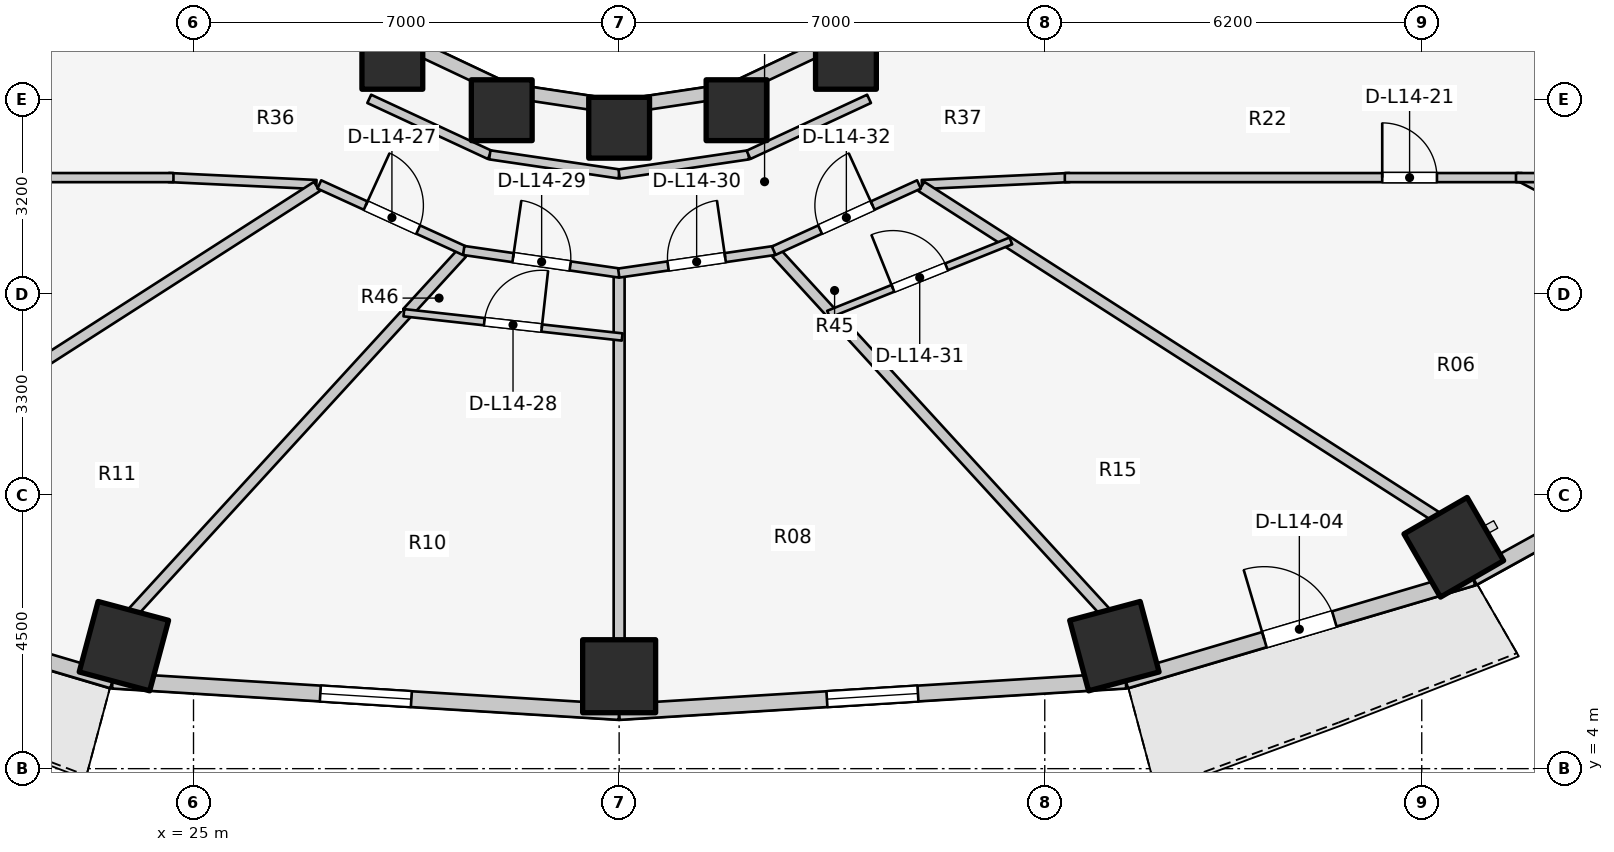
"""IFC4 building model, lengths in metres.
Left out: names, types, materials, properties, quantities, classifications, styles, units other than length and angle.
Written with IfcOpenShell. Run it as: python <this file> out.ifc"""

import sys

from ifc_helpers import new_model, si_unit, direction, frame, frame_2d, origin, origin_2d, place, context, subcontext, project, spatial, rectangle, extrude, element, fill, save


model = new_model("IFC4")
c1 = context("Model", 3, precision=1e-05, world=origin(), true_north=direction((0.0, 1.0)))
c2 = subcontext(c1, "Body", "Model", "MODEL_VIEW")
j1 = project(units=[si_unit("LENGTHUNIT", "METRE"), si_unit("PLANEANGLEUNIT", "RADIAN")], contexts=[c1])
p1 = place(None, origin())
s1 = spatial("IfcSite", under=j1, at=p1, CompositionType="ELEMENT")
p2 = place(p1, origin())
s2 = spatial("IfcBuilding", under=s1, at=p2, CompositionType="ELEMENT")
p3 = place(p2, frame((0.0, 0.0, 49.3)))
s3 = spatial("IfcBuildingStorey", under=s2, at=p3, CompositionType="ELEMENT", Elevation=49.3)
for number, where, z_axis, x_axis in (
    (1, (28.27, 15.673, 0.0), (0.0, 0.0, 1.0), (1.0, 0.0, 0.0)),
    (2, (30.069, 14.828, 0.0), (0.0, 0.0, 1.0), (1.0, 0.0, 0.0)),
):
    element("IfcColumn", number, at=place(p3, frame(where, z_axis=z_axis, x_axis=x_axis)), inside=s3, PredefinedType="COLUMN", context=c2, shape_type="SweptSolid", body=[
        extrude(rectangle(XDim=1.0, YDim=1.0, at=origin_2d()), origin(), (0.0, 0.0, 1.0), 3.1),
    ])
p4 = place(p3, frame((23.855, 6.014, 0.0), z_axis=(0.0, 0.0, 1.0), x_axis=(-0.258819045103, -0.965925826289, 0.0)))
e3 = element("IfcColumn", 3, at=p4, inside=s3, PredefinedType="COLUMN", context=c2, shape_type="SweptSolid", body=[
    extrude(rectangle(XDim=1.2, YDim=1.2, at=origin_2d()), origin(), (0.0, 0.0, 1.0), 3.1),
])
p5 = place(p3, frame((32.0, 14.54, 0.0), z_axis=(0.0, 0.0, 1.0), x_axis=(1.0, 0.0, 0.0)))
e4 = element("IfcColumn", 4, at=p5, inside=s3, PredefinedType="COLUMN", context=c2, shape_type="SweptSolid", body=[
    extrude(rectangle(XDim=1.0, YDim=1.0, at=origin_2d()), origin(), (0.0, 0.0, 1.0), 3.1),
])
p6 = place(p3, frame((32.0, 5.52, 0.0), z_axis=(0.0, 0.0, 1.0), x_axis=(0.0, -1.0, 0.0)))
e5 = element("IfcColumn", 5, at=p6, inside=s3, PredefinedType="COLUMN", context=c2, shape_type="SweptSolid", body=[
    extrude(rectangle(XDim=1.2, YDim=1.2, at=origin_2d()), origin(), (0.0, 0.0, 1.0), 3.1),
])
p7 = place(p3, frame((33.931, 14.828, 0.0), z_axis=(0.0, 0.0, 1.0), x_axis=(1.0, 0.0, 0.0)))
e6 = element("IfcColumn", 6, at=p7, inside=s3, PredefinedType="COLUMN", context=c2, shape_type="SweptSolid", body=[
    extrude(rectangle(XDim=1.0, YDim=1.0, at=origin_2d()), origin(), (0.0, 0.0, 1.0), 3.1),
])
p8 = place(p3, frame((40.145, 6.014, 0.0), z_axis=(0.0, 0.0, 1.0), x_axis=(0.258819045103, -0.965925826289, 0.0)))
e7 = element("IfcColumn", 7, at=p8, inside=s3, PredefinedType="COLUMN", context=c2, shape_type="SweptSolid", body=[
    extrude(rectangle(XDim=1.2, YDim=1.2, at=origin_2d()), origin(), (0.0, 0.0, 1.0), 3.1),
])
p9 = place(p3, frame((35.73, 15.673, 0.0), z_axis=(0.0, 0.0, 1.0), x_axis=(1.0, 0.0, 0.0)))
e8 = element("IfcColumn", 8, at=p9, inside=s3, PredefinedType="COLUMN", context=c2, shape_type="SweptSolid", body=[
    extrude(rectangle(XDim=1.0, YDim=1.0, at=origin_2d()), origin(), (0.0, 0.0, 1.0), 3.1),
])
p10 = place(p3, frame((45.727, 7.641, 0.0), z_axis=(0.0, 0.0, 1.0), x_axis=(0.5, -0.866025403784, 0.0)))
e9 = element("IfcColumn", 9, at=p10, inside=s3, PredefinedType="COLUMN", context=c2, shape_type="SweptSolid", body=[
    extrude(rectangle(XDim=1.2, YDim=1.2, at=origin_2d()), origin(), (0.0, 0.0, 1.0), 3.1),
])
p11 = place(p3, frame((28.44, 15.968, 0.0), z_axis=(0.0, 0.0, 1.0), x_axis=(0.904179699603, -0.427152280606, 0.0)))
e10 = element("IfcWall", 10, at=p11, inside=s3, PredefinedType="STANDARD", context=c2, shape_type="SweptSolid", body=[
    extrude(rectangle(XDim=1.899, YDim=0.23, at=frame_2d((0.95, 0.0))), origin(), (0.0, 0.0, 1.0), 2.16),
])
for number, where, z_axis, x_axis in (
    (11, (30.157, 15.157, 0.0), (0.0, 0.0, 1.0), (0.989, -0.149, 0.0)),
    (12, (32.0, 14.88, 0.0), (0.0, 0.0, 1.0), (0.989, 0.149, 0.0)),
):
    element("IfcWall", number, at=place(p3, frame(where, z_axis=z_axis, x_axis=x_axis)), inside=s3, PredefinedType="STANDARD", context=c2, shape_type="SweptSolid", body=[
        extrude(rectangle(XDim=1.864, YDim=0.23, at=frame_2d((0.932, 0.0))), origin(), (0.0, 0.0, 1.0), 2.16),
    ])
p12 = place(p3, frame((33.843, 15.157, 0.0), z_axis=(0.0, 0.0, 1.0), x_axis=(0.904179699603, 0.427152280606, 0.0)))
e13 = element("IfcWall", 13, at=p12, inside=s3, PredefinedType="STANDARD", context=c2, shape_type="SweptSolid", body=[
    extrude(rectangle(XDim=1.899, YDim=0.23, at=frame_2d((0.95, 0.0))), origin(), (0.0, 0.0, 1.0), 2.16),
])
p13 = place(p3, frame((17.958, 7.138, 0.0), z_axis=(0.0, 0.0, 1.0), x_axis=(0.958843593522, -0.283934786811, 0.0)))
e14 = element("IfcWall", 14, at=p13, inside=s3, PredefinedType="STANDARD", context=c2, shape_type="SweptSolid", body=[
    extrude(rectangle(XDim=5.955, YDim=0.26, at=frame_2d((2.978, 0.0))), origin(), (0.0, 0.0, 1.0), 2.88),
])
p14 = place(p13, frame((2.378, 0.0, 0.0)))
e15 = element("IfcOpeningElement", 15, at=p14, cuts=e14, PredefinedType="OPENING", context=c2, shape_type="SweptSolid", body=[
    extrude(rectangle(XDim=1.2, YDim=2.2, at=frame_2d((0.6, 1.1))), frame((0.0, 0.14, 0.0), z_axis=(0.0, -1.0, 0.0), x_axis=(1.0, 0.0, 0.0)), (0.0, 0.0, 1.0), 0.28),
])
p15 = place(p3, frame((23.668, 5.447, 0.0), z_axis=(0.0, 0.0, 1.0), x_axis=(0.998090514779, -0.061768311519, 0.0)))
e16 = element("IfcWall", 16, at=p15, inside=s3, PredefinedType="STANDARD", context=c2, shape_type="SweptSolid", body=[
    extrude(rectangle(XDim=8.348, YDim=0.26, at=frame_2d((4.174, 0.0))), origin(), (0.0, 0.0, 1.0), 2.85),
])
p16 = place(p15, frame((3.424, 0.0, 0.75)))
e17 = element("IfcOpeningElement", 17, at=p16, cuts=e16, PredefinedType="OPENING", context=c2, shape_type="SweptSolid", body=[
    extrude(rectangle(XDim=1.5, YDim=1.6, at=frame_2d((0.75, 0.8))), frame((0.0, 0.14, 0.0), z_axis=(0.0, -1.0, 0.0), x_axis=(1.0, 0.0, 0.0)), (0.0, 0.0, 1.0), 0.28),
])
p17 = place(p3, frame((32.0, 4.931, 0.0), z_axis=(0.0, 0.0, 1.0), x_axis=(0.998090514779, 0.061768311519, 0.0)))
e18 = element("IfcWall", 18, at=p17, inside=s3, PredefinedType="STANDARD", context=c2, shape_type="SweptSolid", body=[
    extrude(rectangle(XDim=8.348, YDim=0.26, at=frame_2d((4.174, 0.0))), origin(), (0.0, 0.0, 1.0), 2.85),
])
p18 = place(p17, frame((3.424, 0.0, 0.75)))
e19 = element("IfcOpeningElement", 19, at=p18, cuts=e18, PredefinedType="OPENING", context=c2, shape_type="SweptSolid", body=[
    extrude(rectangle(XDim=1.5, YDim=1.6, at=frame_2d((0.75, 0.8))), frame((0.0, 0.14, 0.0), z_axis=(0.0, -1.0, 0.0), x_axis=(1.0, 0.0, 0.0)), (0.0, 0.0, 1.0), 0.28),
])
p19 = place(p3, frame((40.332, 5.447, 0.0), z_axis=(0.0, 0.0, 1.0), x_axis=(0.958843593522, 0.283934786811, 0.0)))
e20 = element("IfcWall", 20, at=p19, inside=s3, PredefinedType="STANDARD", context=c2, shape_type="SweptSolid", body=[
    extrude(rectangle(XDim=5.955, YDim=0.26, at=frame_2d((2.978, 0.0))), origin(), (0.0, 0.0, 1.0), 2.88),
])
p20 = place(p19, frame((2.378, 0.0, 0.0)))
e21 = element("IfcOpeningElement", 21, at=p20, cuts=e20, PredefinedType="OPENING", context=c2, shape_type="SweptSolid", body=[
    extrude(rectangle(XDim=1.2, YDim=2.2, at=frame_2d((0.6, 1.1))), frame((0.0, 0.14, 0.0), z_axis=(0.0, -1.0, 0.0), x_axis=(1.0, 0.0, 0.0)), (0.0, 0.0, 1.0), 0.28),
])
p21 = place(p3, frame((46.042, 7.138, 0.0), z_axis=(0.0, 0.0, 1.0), x_axis=(0.875137303239, 0.483874674352, 0.0)))
e22 = element("IfcWall", 22, at=p21, inside=s3, PredefinedType="STANDARD", context=c2, shape_type="SweptSolid", body=[
    extrude(rectangle(XDim=4.985, YDim=0.26, at=frame_2d((2.493, 0.0))), origin(), (0.0, 0.0, 1.0), 2.85),
])
p22 = place(p3, frame((27.89, 15.015, 0.0), z_axis=(0.0, 0.0, 1.0), x_axis=(0.906943449489, -0.421252393975, 0.0)))
e23 = element("IfcWall", 23, at=p22, inside=s3, PredefinedType="PARTITIONING", context=c2, shape_type="SweptSolid", body=[
    extrude(rectangle(XDim=2.186, YDim=0.15, at=frame_2d((1.093, 0.0))), origin(), (0.0, 0.0, 1.0), 2.237),
])
for number, where, z_axis, x_axis in (
    (24, (29.873, 14.094, 0.0), (0.0, 0.0, 1.0), (0.989, -0.146, 0.0)),
    (25, (32.0, 13.78, 0.0), (0.0, 0.0, 1.0), (0.989, 0.146, 0.0)),
):
    element("IfcWall", number, at=place(p3, frame(where, z_axis=z_axis, x_axis=x_axis)), inside=s3, PredefinedType="PARTITIONING", context=c2, shape_type="SweptSolid", body=[
        extrude(rectangle(XDim=2.151, YDim=0.15, at=frame_2d((1.075, 0.0))), origin(), (0.0, 0.0, 1.0), 2.237),
    ])
p23 = place(p3, frame((34.127, 14.094, 0.0), z_axis=(0.0, 0.0, 1.0), x_axis=(0.906943449489, 0.421252393975, 0.0)))
e26 = element("IfcWall", 26, at=p23, inside=s3, PredefinedType="PARTITIONING", context=c2, shape_type="SweptSolid", body=[
    extrude(rectangle(XDim=2.186, YDim=0.15, at=frame_2d((1.093, 0.0))), origin(), (0.0, 0.0, 1.0), 2.237),
])
p24 = place(p3, frame((27.02, 13.606, 0.0), z_axis=(0.0, 0.0, 1.0), x_axis=(-0.998877427952, 0.047369651964, 0.0)))
e27 = element("IfcWall", 27, at=p24, inside=s3, PredefinedType="PARTITIONING", context=c2, shape_type="SweptSolid", body=[
    extrude(rectangle(XDim=2.433, YDim=0.15, at=frame_2d((1.216, 0.0))), origin(), (0.0, 0.0, 1.0), 2.237),
])
p25 = place(p3, frame((17.15, 13.72, 0.0), z_axis=(0.0, 0.0, 1.0), x_axis=(1.0, 0.0, 0.0)))
e28 = element("IfcWall", 28, at=p25, inside=s3, PredefinedType="PARTITIONING", context=c2, shape_type="SweptSolid", body=[
    extrude(rectangle(XDim=7.52, YDim=0.15, at=frame_2d((3.76, 0.0))), origin(), (0.0, 0.0, 1.0), 2.237),
])
p26 = place(p25, frame((1.3, 0.0, 0.0)))
e29 = element("IfcOpeningElement", 29, at=p26, cuts=e28, PredefinedType="OPENING", context=c2, shape_type="SweptSolid", body=[
    extrude(rectangle(XDim=0.9, YDim=2.1, at=frame_2d((0.45, 1.05))), frame((0.0, 0.085, 0.0), z_axis=(0.0, -1.0, 0.0), x_axis=(1.0, 0.0, 0.0)), (0.0, 0.0, 1.0), 0.17),
])
p27 = place(p3, frame((46.756, 13.743, 0.0), z_axis=(0.0, 0.0, 1.0), x_axis=(0.885586030676, -0.464475383924, 0.0)))
e30 = element("IfcWall", 30, at=p27, inside=s3, PredefinedType="MOVABLE", context=c2, shape_type="SweptSolid", body=[
    extrude(rectangle(XDim=2.376, YDim=0.12, at=frame_2d((1.188, 0.0))), origin(), (0.0, 0.0, 1.0), 2.855),
])
p28 = place(p3, frame((36.98, 13.606, 0.0), z_axis=(0.0, 0.0, 1.0), x_axis=(0.998877427952, 0.047369651964, 0.0)))
e31 = element("IfcWall", 31, at=p28, inside=s3, PredefinedType="PARTITIONING", context=c2, shape_type="SweptSolid", body=[
    extrude(rectangle(XDim=2.433, YDim=0.15, at=frame_2d((1.216, 0.0))), origin(), (0.0, 0.0, 1.0), 2.237),
])
p29 = place(p3, frame((39.33, 13.72, 0.0), z_axis=(0.0, 0.0, 1.0), x_axis=(1.0, 0.0, 0.0)))
e32 = element("IfcWall", 32, at=p29, inside=s3, PredefinedType="PARTITIONING", context=c2, shape_type="SweptSolid", body=[
    extrude(rectangle(XDim=7.52, YDim=0.15, at=frame_2d((3.76, 0.0))), origin(), (0.0, 0.0, 1.0), 2.237),
])
p30 = place(p29, frame((5.22, 0.0, 0.0)))
e33 = element("IfcOpeningElement", 33, at=p30, cuts=e32, PredefinedType="OPENING", context=c2, shape_type="SweptSolid", body=[
    extrude(rectangle(XDim=0.9, YDim=2.1, at=frame_2d((0.45, 1.05))), frame((0.0, 0.085, 0.0), z_axis=(0.0, -1.0, 0.0), x_axis=(1.0, 0.0, 0.0)), (0.0, 0.0, 1.0), 0.17),
])
p31 = place(p3, frame((46.75, 13.72, 0.0), z_axis=(0.0, 0.0, 1.0), x_axis=(1.0, 0.0, 0.0)))
e34 = element("IfcWall", 34, at=p31, inside=s3, PredefinedType="PARTITIONING", context=c2, shape_type="SweptSolid", body=[
    extrude(rectangle(XDim=5.05, YDim=0.15, at=frame_2d((2.525, 0.0))), origin(), (0.0, 0.0, 1.0), 2.069),
])
p32 = place(p3, frame((27.029, 13.574, 0.0), z_axis=(0.0, 0.0, 1.0), x_axis=(-0.841689919529, -0.5399611832, 0.0)))
e35 = element("IfcWall", 35, at=p32, inside=s3, PredefinedType="PARTITIONING", context=c2, shape_type="SweptSolid", body=[
    extrude(rectangle(XDim=10.058, YDim=0.18, at=frame_2d((5.029, 0.0))), origin(), (0.0, 0.0, 1.0), 2.237),
])
p33 = place(p3, frame((29.414, 12.479, 0.0), z_axis=(0.0, 0.0, 1.0), x_axis=(-0.675465011224, -0.737392038615, 0.0)))
e36 = element("IfcWall", 36, at=p33, inside=s3, PredefinedType="PARTITIONING", context=c2, shape_type="SweptSolid", body=[
    extrude(rectangle(XDim=8.007, YDim=0.18, at=frame_2d((4.003, 0.0))), origin(), (0.0, 0.0, 1.0), 2.237),
])
p34 = place(p3, frame((32.0, 12.095, 0.0), z_axis=(0.0, 0.0, 1.0), x_axis=(0.0, -1.0, 0.0)))
e37 = element("IfcWall", 37, at=p34, inside=s3, PredefinedType="PARTITIONING", context=c2, shape_type="SweptSolid", body=[
    extrude(rectangle(XDim=5.995, YDim=0.18, at=frame_2d((2.998, 0.0))), origin(), (0.0, 0.0, 1.0), 2.237),
])
p35 = place(p3, frame((34.586, 12.479, 0.0), z_axis=(0.0, 0.0, 1.0), x_axis=(0.675465011224, -0.737392038615, 0.0)))
e38 = element("IfcWall", 38, at=p35, inside=s3, PredefinedType="PARTITIONING", context=c2, shape_type="SweptSolid", body=[
    extrude(rectangle(XDim=8.007, YDim=0.18, at=frame_2d((4.003, 0.0))), origin(), (0.0, 0.0, 1.0), 2.237),
])
p36 = place(p3, frame((36.971, 13.574, 0.0), z_axis=(0.0, 0.0, 1.0), x_axis=(0.841689919529, -0.5399611832, 0.0)))
e39 = element("IfcWall", 39, at=p36, inside=s3, PredefinedType="PARTITIONING", context=c2, shape_type="SweptSolid", body=[
    extrude(rectangle(XDim=10.058, YDim=0.18, at=frame_2d((5.029, 0.0))), origin(), (0.0, 0.0, 1.0), 2.237),
])
p37 = place(p3, frame((27.069, 13.607, 0.0), z_axis=(0.0, 0.0, 1.0), x_axis=(0.909747571199, -0.415161843982, 0.0)))
e40 = element("IfcWall", 40, at=p37, inside=s3, PredefinedType="PARTITIONING", context=c2, shape_type="SweptSolid", body=[
    extrude(rectangle(XDim=2.625, YDim=0.15, at=frame_2d((1.312, 0.0))), origin(), (0.0, 0.0, 1.0), 2.237),
])
p38 = place(p37, frame((0.838, 0.0, 0.0)))
e41 = element("IfcOpeningElement", 41, at=p38, cuts=e40, PredefinedType="OPENING", context=c2, shape_type="SweptSolid", body=[
    extrude(rectangle(XDim=0.95, YDim=2.1, at=frame_2d((0.475, 1.05))), frame((0.0, 0.085, 0.0), z_axis=(0.0, -1.0, 0.0), x_axis=(1.0, 0.0, 0.0)), (0.0, 0.0, 1.0), 0.17),
])
p39 = place(p3, frame((28.46, 11.498, 0.0), z_axis=(0.0, 0.0, 1.0), x_axis=(0.993882910401, -0.110438944277, 0.0)))
e42 = element("IfcWall", 42, at=p39, inside=s3, PredefinedType="MOVABLE", context=c2, shape_type="SweptSolid", body=[
    extrude(rectangle(XDim=3.612, YDim=0.12, at=frame_2d((1.806, 0.0))), origin(), (0.0, 0.0, 1.0), 2.237),
])
p40 = place(p39, frame((1.331, 0.0, 0.0)))
e43 = element("IfcOpeningElement", 43, at=p40, cuts=e42, PredefinedType="OPENING", context=c2, shape_type="SweptSolid", body=[
    extrude(rectangle(XDim=0.95, YDim=2.1, at=frame_2d((0.475, 1.05))), frame((0.0, 0.07, 0.0), z_axis=(0.0, -1.0, 0.0), x_axis=(1.0, 0.0, 0.0)), (0.0, 0.0, 1.0), 0.14),
])
p41 = place(p3, frame((29.444, 12.522, 0.0), z_axis=(0.0, 0.0, 1.0), x_axis=(0.989637894688, -0.143585644814, 0.0)))
e44 = element("IfcWall", 44, at=p41, inside=s3, PredefinedType="PARTITIONING", context=c2, shape_type="SweptSolid", body=[
    extrude(rectangle(XDim=2.59, YDim=0.15, at=frame_2d((1.295, 0.0))), origin(), (0.0, 0.0, 1.0), 2.237),
])
p42 = place(p41, frame((0.82, 0.0, 0.0)))
e45 = element("IfcOpeningElement", 45, at=p42, cuts=e44, PredefinedType="OPENING", context=c2, shape_type="SweptSolid", body=[
    extrude(rectangle(XDim=0.95, YDim=2.1, at=frame_2d((0.475, 1.05))), frame((0.0, 0.085, 0.0), z_axis=(0.0, -1.0, 0.0), x_axis=(1.0, 0.0, 0.0)), (0.0, 0.0, 1.0), 0.17),
])
p43 = place(p3, frame((31.993, 12.15, 0.0), z_axis=(0.0, 0.0, 1.0), x_axis=(0.989637894688, 0.143585644814, 0.0)))
e46 = element("IfcWall", 46, at=p43, inside=s3, PredefinedType="PARTITIONING", context=c2, shape_type="SweptSolid", body=[
    extrude(rectangle(XDim=2.59, YDim=0.15, at=frame_2d((1.295, 0.0))), origin(), (0.0, 0.0, 1.0), 2.237),
])
p44 = place(p43, frame((0.82, 0.0, 0.0)))
e47 = element("IfcOpeningElement", 47, at=p44, cuts=e46, PredefinedType="OPENING", context=c2, shape_type="SweptSolid", body=[
    extrude(rectangle(XDim=0.95, YDim=2.1, at=frame_2d((0.475, 1.05))), frame((0.0, 0.085, 0.0), z_axis=(0.0, -1.0, 0.0), x_axis=(1.0, 0.0, 0.0)), (0.0, 0.0, 1.0), 0.17),
])
p45 = place(p3, frame((35.444, 11.474, 0.0), z_axis=(0.0, 0.0, 1.0), x_axis=(0.927886718772, 0.372862222713, 0.0)))
e48 = element("IfcWall", 48, at=p45, inside=s3, PredefinedType="MOVABLE", context=c2, shape_type="SweptSolid", body=[
    extrude(rectangle(XDim=3.231, YDim=0.12, at=frame_2d((1.616, 0.0))), origin(), (0.0, 0.0, 1.0), 2.237),
])
p46 = place(p45, frame((1.141, 0.0, 0.0)))
e49 = element("IfcOpeningElement", 49, at=p46, cuts=e48, PredefinedType="OPENING", context=c2, shape_type="SweptSolid", body=[
    extrude(rectangle(XDim=0.95, YDim=2.1, at=frame_2d((0.475, 1.05))), frame((0.0, 0.07, 0.0), z_axis=(0.0, -1.0, 0.0), x_axis=(1.0, 0.0, 0.0)), (0.0, 0.0, 1.0), 0.14),
])
p47 = place(p3, frame((34.543, 12.518, 0.0), z_axis=(0.0, 0.0, 1.0), x_axis=(0.909747571199, 0.415161843982, 0.0)))
e50 = element("IfcWall", 50, at=p47, inside=s3, PredefinedType="PARTITIONING", context=c2, shape_type="SweptSolid", body=[
    extrude(rectangle(XDim=2.625, YDim=0.15, at=frame_2d((1.312, 0.0))), origin(), (0.0, 0.0, 1.0), 2.237),
])
p48 = place(p47, frame((0.838, 0.0, 0.0)))
e51 = element("IfcOpeningElement", 51, at=p48, cuts=e50, PredefinedType="OPENING", context=c2, shape_type="SweptSolid", body=[
    extrude(rectangle(XDim=0.95, YDim=2.1, at=frame_2d((0.475, 1.05))), frame((0.0, 0.085, 0.0), z_axis=(0.0, -1.0, 0.0), x_axis=(1.0, 0.0, 0.0)), (0.0, 0.0, 1.0), 0.17),
])
p49 = place(p16, origin())
e52 = element("IfcWindow", 52, at=p49, inside=s3, PartitioningType="SINGLE_PANEL", PredefinedType="WINDOW", context=c2, shape_type="SweptSolid", body=[
    extrude(rectangle(XDim=1.5, YDim=1.6, at=frame_2d((0.75, 0.8))), frame((0.0, 0.03, 0.0), z_axis=(0.0, -1.0, 0.0), x_axis=(1.0, 0.0, 0.0)), (0.0, 0.0, 1.0), 0.06),
])
fill(e17, e52)
p50 = place(p18, origin())
e53 = element("IfcWindow", 53, at=p50, inside=s3, PartitioningType="SINGLE_PANEL", PredefinedType="WINDOW", context=c2, shape_type="SweptSolid", body=[
    extrude(rectangle(XDim=1.5, YDim=1.6, at=frame_2d((0.75, 0.8))), frame((0.0, 0.03, 0.0), z_axis=(0.0, -1.0, 0.0), x_axis=(1.0, 0.0, 0.0)), (0.0, 0.0, 1.0), 0.06),
])
fill(e19, e53)
p51 = place(p20, origin())
e54 = element("IfcDoor", 54, at=p51, inside=s3, OperationType="SINGLE_SWING_LEFT", PredefinedType="DOOR", context=c2, shape_type="SweptSolid", body=[
    extrude(rectangle(XDim=1.2, YDim=2.2, at=frame_2d((0.6, 1.1))), frame((0.0, 0.025, 0.0), z_axis=(0.0, -1.0, 0.0), x_axis=(1.0, 0.0, 0.0)), (0.0, 0.0, 1.0), 0.05),
])
fill(e21, e54)
p52 = place(p30, origin())
e55 = element("IfcDoor", 55, at=p52, inside=s3, OperationType="SINGLE_SWING_LEFT", PredefinedType="DOOR", context=c2, shape_type="SweptSolid", body=[
    extrude(rectangle(XDim=0.9, YDim=2.1, at=frame_2d((0.45, 1.05))), frame((0.0, 0.025, 0.0), z_axis=(0.0, -1.0, 0.0), x_axis=(1.0, 0.0, 0.0)), (0.0, 0.0, 1.0), 0.05),
])
fill(e33, e55)
p53 = place(p38, origin())
e56 = element("IfcDoor", 56, at=p53, inside=s3, OperationType="SINGLE_SWING_LEFT", PredefinedType="DOOR", context=c2, shape_type="SweptSolid", body=[
    extrude(rectangle(XDim=0.95, YDim=2.1, at=frame_2d((0.475, 1.05))), frame((0.0, 0.025, 0.0), z_axis=(0.0, -1.0, 0.0), x_axis=(1.0, 0.0, 0.0)), (0.0, 0.0, 1.0), 0.05),
])
fill(e41, e56)
p54 = place(p40, origin())
e57 = element("IfcDoor", 57, at=p54, inside=s3, OperationType="SINGLE_SWING_RIGHT", PredefinedType="DOOR", context=c2, shape_type="SweptSolid", body=[
    extrude(rectangle(XDim=0.95, YDim=2.1, at=frame_2d((0.475, 1.05))), frame((0.0, 0.025, 0.0), z_axis=(0.0, -1.0, 0.0), x_axis=(1.0, 0.0, 0.0)), (0.0, 0.0, 1.0), 0.05),
])
fill(e43, e57)
p55 = place(p42, origin())
e58 = element("IfcDoor", 58, at=p55, inside=s3, OperationType="SINGLE_SWING_LEFT", PredefinedType="DOOR", context=c2, shape_type="SweptSolid", body=[
    extrude(rectangle(XDim=0.95, YDim=2.1, at=frame_2d((0.475, 1.05))), frame((0.0, 0.025, 0.0), z_axis=(0.0, -1.0, 0.0), x_axis=(1.0, 0.0, 0.0)), (0.0, 0.0, 1.0), 0.05),
])
fill(e45, e58)
p56 = place(p44, origin())
e59 = element("IfcDoor", 59, at=p56, inside=s3, OperationType="SINGLE_SWING_RIGHT", PredefinedType="DOOR", context=c2, shape_type="SweptSolid", body=[
    extrude(rectangle(XDim=0.95, YDim=2.1, at=frame_2d((0.475, 1.05))), frame((0.0, 0.025, 0.0), z_axis=(0.0, -1.0, 0.0), x_axis=(1.0, 0.0, 0.0)), (0.0, 0.0, 1.0), 0.05),
])
fill(e47, e59)
p57 = place(p46, origin())
e60 = element("IfcDoor", 60, at=p57, inside=s3, OperationType="SINGLE_SWING_LEFT", PredefinedType="DOOR", context=c2, shape_type="SweptSolid", body=[
    extrude(rectangle(XDim=0.95, YDim=2.1, at=frame_2d((0.475, 1.05))), frame((0.0, 0.025, 0.0), z_axis=(0.0, -1.0, 0.0), x_axis=(1.0, 0.0, 0.0)), (0.0, 0.0, 1.0), 0.05),
])
fill(e49, e60)
p58 = place(p48, origin())
e61 = element("IfcDoor", 61, at=p58, inside=s3, OperationType="SINGLE_SWING_RIGHT", PredefinedType="DOOR", context=c2, shape_type="SweptSolid", body=[
    extrude(rectangle(XDim=0.95, YDim=2.1, at=frame_2d((0.475, 1.05))), frame((0.0, 0.025, 0.0), z_axis=(0.0, -1.0, 0.0), x_axis=(1.0, 0.0, 0.0)), (0.0, 0.0, 1.0), 0.05),
])
fill(e51, e61)
save(model, sys.argv[1])
